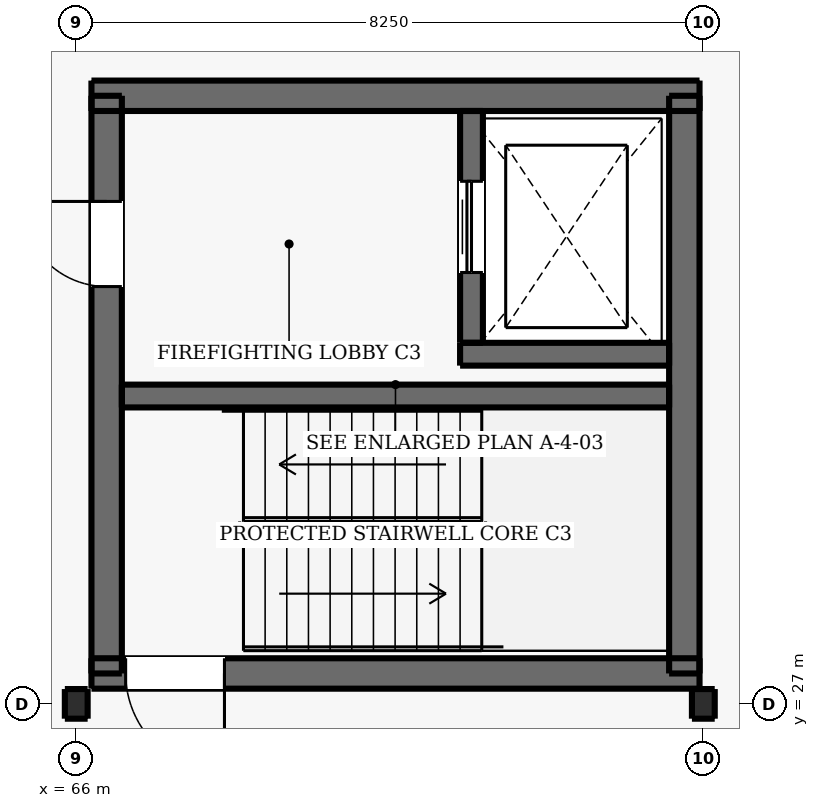
"""IFC4 building model, lengths in metres.
Left out: names, types, materials, properties, quantities, classifications, styles, units other than length and angle.
Written with IfcOpenShell. Run it as: python <this file> out.ifc"""

import sys

from ifc_helpers import new_model, si_unit, direction, frame, frame_2d, origin, origin_2d, place, context, subcontext, project, spatial, rectangle, i_section, extrude, element, fill, save


model = new_model("IFC4")
c1 = context("Model", 3, precision=1e-05, world=origin(), true_north=direction((0.0, 1.0)))
c2 = subcontext(c1, "Body", "Model", "MODEL_VIEW")
j1 = project(units=[si_unit("LENGTHUNIT", "METRE"), si_unit("PLANEANGLEUNIT", "RADIAN")], contexts=[c1])
p1 = place(None, origin())
s1 = spatial("IfcSite", under=j1, at=p1, CompositionType="ELEMENT")
p2 = place(p1, origin())
s2 = spatial("IfcBuilding", under=s1, at=p2, CompositionType="ELEMENT")
p3 = place(p2, frame((0.0, 0.0, 22.2)))
s3 = spatial("IfcBuildingStorey", under=s2, at=p3, CompositionType="ELEMENT", Elevation=22.2)
for number, where, z_axis, x_axis in (
    (1, (66.0, 27.0, 0.0), (0.0, 0.0, 1.0), (1.0, 0.0, 0.0)),
    (2, (74.25, 27.0, 0.0), (0.0, 0.0, 1.0), (1.0, 0.0, 0.0)),
):
    element("IfcColumn", number, at=place(p3, frame(where, z_axis=z_axis, x_axis=x_axis)), inside=s3, PredefinedType="COLUMN", context=c2, shape_type="SweptSolid", body=[
        extrude(i_section(OverallWidth=0.3, OverallDepth=0.39, WebThickness=0.011, FlangeThickness=0.019, FilletRadius=0.027, at=origin_2d()), origin(), (0.0, 0.0, 1.0), 4.2),
    ])
p4 = place(p3, frame((66.2, 27.4, 0.0), z_axis=(0.0, 0.0, 1.0), x_axis=(1.0, 0.0, 0.0)))
e3 = element("IfcWall", 3, at=p4, inside=s3, PredefinedType="SHEAR", context=c2, shape_type="SweptSolid", body=[
    extrude(rectangle(XDim=8.0, YDim=0.4, at=frame_2d((4.0, 0.0))), origin(), (0.0, 0.0, 1.0), 4.2),
])
p5 = place(p4, frame((0.45, 0.0, 0.0)))
e4 = element("IfcOpeningElement", 4, at=p5, cuts=e3, PredefinedType="OPENING", context=c2, shape_type="SweptSolid", body=[
    extrude(rectangle(XDim=1.3, YDim=2.15, at=frame_2d((0.65, 1.075))), frame((0.0, 0.21, 0.0), z_axis=(0.0, -1.0, 0.0), x_axis=(1.0, 0.0, 0.0)), (0.0, 0.0, 1.0), 0.42),
])
p6 = place(p3, frame((66.2, 35.0, 0.0), z_axis=(0.0, 0.0, 1.0), x_axis=(1.0, 0.0, 0.0)))
e5 = element("IfcWall", 5, at=p6, inside=s3, PredefinedType="SHEAR", context=c2, shape_type="SweptSolid", body=[
    extrude(rectangle(XDim=8.0, YDim=0.4, at=frame_2d((4.0, 0.0))), origin(), (0.0, 0.0, 1.0), 4.2),
])
p7 = place(p3, frame((66.4, 27.4, 0.0), z_axis=(0.0, 0.0, 1.0), x_axis=(0.0, 1.0, 0.0)))
e6 = element("IfcWall", 6, at=p7, inside=s3, PredefinedType="SHEAR", context=c2, shape_type="SweptSolid", body=[
    extrude(rectangle(XDim=7.6, YDim=0.4, at=frame_2d((3.8, 0.0))), origin(), (0.0, 0.0, 1.0), 4.2),
])
p8 = place(p7, frame((5.09, 0.0, 0.0)))
e7 = element("IfcOpeningElement", 7, at=p8, cuts=e6, PredefinedType="OPENING", context=c2, shape_type="SweptSolid", body=[
    extrude(rectangle(XDim=1.12, YDim=2.15, at=frame_2d((0.56, 1.075))), frame((0.0, 0.21, 0.0), z_axis=(0.0, -1.0, 0.0), x_axis=(1.0, 0.0, 0.0)), (0.0, 0.0, 1.0), 0.42),
])
p9 = place(p3, frame((74.0, 27.4, 0.0), z_axis=(0.0, 0.0, 1.0), x_axis=(0.0, 1.0, 0.0)))
e8 = element("IfcWall", 8, at=p9, inside=s3, PredefinedType="SHEAR", context=c2, shape_type="SweptSolid", body=[
    extrude(rectangle(XDim=7.6, YDim=0.4, at=frame_2d((3.8, 0.0))), origin(), (0.0, 0.0, 1.0), 4.2),
])
p10 = place(p3, frame((66.6, 31.05, 0.0), z_axis=(0.0, 0.0, 1.0), x_axis=(1.0, 0.0, 0.0)))
e9 = element("IfcWall", 9, at=p10, inside=s3, PredefinedType="SHEAR", context=c2, shape_type="SweptSolid", body=[
    extrude(rectangle(XDim=7.2, YDim=0.3, at=frame_2d((3.6, 0.0))), origin(), (0.0, 0.0, 1.0), 4.2),
])
p11 = place(p3, frame((71.05, 31.6, 0.0), z_axis=(0.0, 0.0, 1.0), x_axis=(1.0, 0.0, 0.0)))
e10 = element("IfcWall", 10, at=p11, inside=s3, PredefinedType="SHEAR", context=c2, shape_type="SweptSolid", body=[
    extrude(rectangle(XDim=2.75, YDim=0.3, at=frame_2d((1.375, 0.0))), origin(), (0.0, 0.0, 1.0), 4.2),
])
p12 = place(p3, frame((71.2, 31.75, 0.0), z_axis=(0.0, 0.0, 1.0), x_axis=(0.0, 1.0, 0.0)))
e11 = element("IfcWall", 11, at=p12, inside=s3, PredefinedType="SHEAR", context=c2, shape_type="SweptSolid", body=[
    extrude(rectangle(XDim=3.05, YDim=0.3, at=frame_2d((1.525, 0.0))), origin(), (0.0, 0.0, 1.0), 4.2),
])
p13 = place(p12, frame((0.925, 0.0, 0.0)))
e12 = element("IfcOpeningElement", 12, at=p13, cuts=e11, PredefinedType="OPENING", context=c2, shape_type="SweptSolid", body=[
    extrude(rectangle(XDim=1.2, YDim=2.15, at=frame_2d((0.6, 1.075))), frame((0.0, 0.16, 0.0), z_axis=(0.0, -1.0, 0.0), x_axis=(1.0, 0.0, 0.0)), (0.0, 0.0, 1.0), 0.32),
])
p14 = place(p13, origin())
e13 = element("IfcDoor", 13, at=p14, inside=s3, OperationType="DOUBLE_DOOR_SLIDING", PredefinedType="DOOR", context=c2, shape_type="SweptSolid", body=[
    extrude(rectangle(XDim=1.2, YDim=2.15, at=frame_2d((0.6, 1.075))), frame((0.0, 0.025, 0.0), z_axis=(0.0, -1.0, 0.0), x_axis=(1.0, 0.0, 0.0)), (0.0, 0.0, 1.0), 0.05),
])
fill(e12, e13)
p15 = place(p8, origin())
e14 = element("IfcDoor", 14, at=p15, inside=s3, OperationType="SINGLE_SWING_RIGHT", PredefinedType="DOOR", context=c2, shape_type="SweptSolid", body=[
    extrude(rectangle(XDim=1.12, YDim=2.15, at=frame_2d((0.56, 1.075))), frame((0.0, 0.025, 0.0), z_axis=(0.0, -1.0, 0.0), x_axis=(1.0, 0.0, 0.0)), (0.0, 0.0, 1.0), 0.05),
])
fill(e7, e14)
p16 = place(p5, frame((1.3, 0.0, 0.0), z_axis=(0.0, 0.0, 1.0), x_axis=(-1.0, 0.0, 0.0)))
e15 = element("IfcDoor", 15, at=p16, inside=s3, OperationType="SINGLE_SWING_RIGHT", PredefinedType="DOOR", context=c2, shape_type="SweptSolid", body=[
    extrude(rectangle(XDim=1.3, YDim=2.15, at=frame_2d((0.65, 1.075))), frame((0.0, 0.025, 0.0), z_axis=(0.0, -1.0, 0.0), x_axis=(1.0, 0.0, 0.0)), (0.0, 0.0, 1.0), 0.05),
])
fill(e4, e15)
save(model, sys.argv[1])
